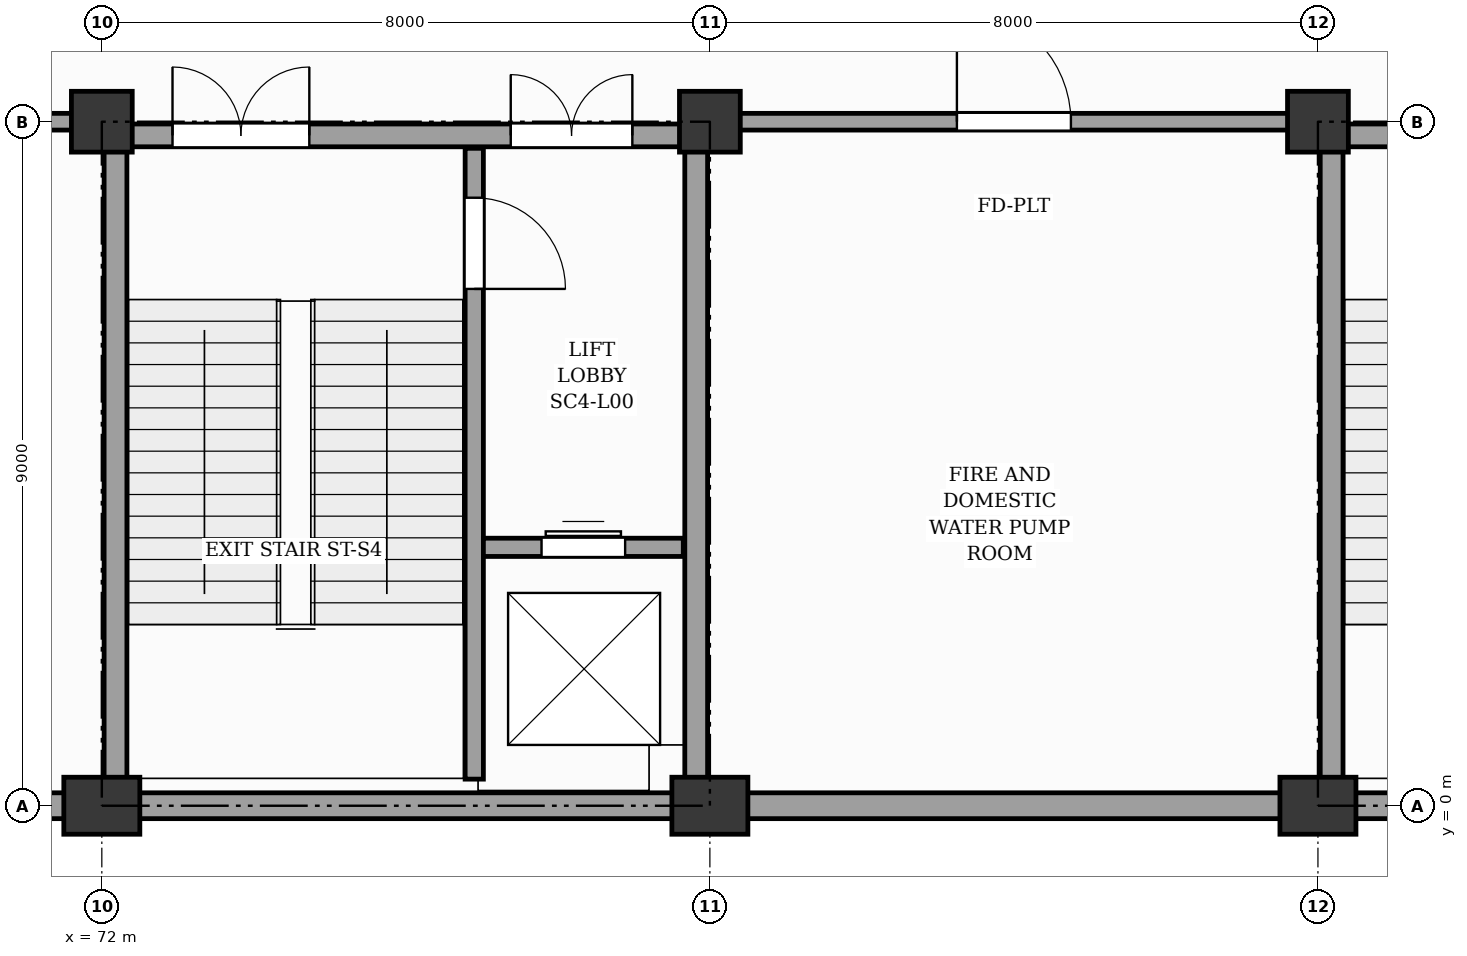
"""IFC4 building model, lengths in metres.
Left out: names, types, materials, properties, quantities, classifications, styles, units other than length and angle.
Written with IfcOpenShell. Run it as: python <this file> out.ifc"""

import sys

from ifc_helpers import new_model, si_unit, direction, frame, frame_2d, origin, origin_2d, place, context, subcontext, project, spatial, rectangle, extrude, element, fill, save


model = new_model("IFC4")
c1 = context("Model", 3, precision=1e-05, world=origin(), true_north=direction((0.0, 1.0)))
c2 = subcontext(c1, "Body", "Model", "MODEL_VIEW")
j1 = project(units=[si_unit("LENGTHUNIT", "METRE"), si_unit("PLANEANGLEUNIT", "RADIAN")], contexts=[c1])
p1 = place(None, origin())
s1 = spatial("IfcSite", under=j1, at=p1, CompositionType="ELEMENT")
p2 = place(p1, origin())
s2 = spatial("IfcBuilding", under=s1, at=p2, CompositionType="ELEMENT")
p3 = place(p2, origin())
s3 = spatial("IfcBuildingStorey", under=s2, at=p3, CompositionType="ELEMENT", Elevation=0.0)
p4 = place(p3, frame((72.0, 0.0, -0.3), z_axis=(0.0, 0.0, 1.0), x_axis=(1.0, 0.0, 0.0)))
e1 = element("IfcColumn", 1, at=p4, inside=s3, PredefinedType="PILASTER", context=c2, shape_type="SweptSolid", body=[
    extrude(rectangle(XDim=1.0, YDim=0.75, at=origin_2d()), origin(), (0.0, 0.0, 1.0), 5.1),
])
p5 = place(p3, frame((72.0, 9.0, -0.3), z_axis=(0.0, 0.0, 1.0), x_axis=(1.0, 0.0, 0.0)))
e2 = element("IfcColumn", 2, at=p5, inside=s3, PredefinedType="COLUMN", context=c2, shape_type="SweptSolid", body=[
    extrude(rectangle(XDim=0.8, YDim=0.8, at=origin_2d()), origin(), (0.0, 0.0, 1.0), 5.1),
])
p6 = place(p3, frame((80.0, 0.0, -0.3), z_axis=(0.0, 0.0, 1.0), x_axis=(1.0, 0.0, 0.0)))
e3 = element("IfcColumn", 3, at=p6, inside=s3, PredefinedType="PILASTER", context=c2, shape_type="SweptSolid", body=[
    extrude(rectangle(XDim=1.0, YDim=0.75, at=origin_2d()), origin(), (0.0, 0.0, 1.0), 5.1),
])
p7 = place(p3, frame((80.0, 9.0, -0.3), z_axis=(0.0, 0.0, 1.0), x_axis=(1.0, 0.0, 0.0)))
e4 = element("IfcColumn", 4, at=p7, inside=s3, PredefinedType="COLUMN", context=c2, shape_type="SweptSolid", body=[
    extrude(rectangle(XDim=0.8, YDim=0.8, at=origin_2d()), origin(), (0.0, 0.0, 1.0), 5.1),
])
p8 = place(p3, frame((88.0, 0.0, -0.3), z_axis=(0.0, 0.0, 1.0), x_axis=(1.0, 0.0, 0.0)))
e5 = element("IfcColumn", 5, at=p8, inside=s3, PredefinedType="PILASTER", context=c2, shape_type="SweptSolid", body=[
    extrude(rectangle(XDim=1.0, YDim=0.75, at=origin_2d()), origin(), (0.0, 0.0, 1.0), 5.1),
])
p9 = place(p3, frame((88.0, 9.0, -0.3), z_axis=(0.0, 0.0, 1.0), x_axis=(1.0, 0.0, 0.0)))
e6 = element("IfcColumn", 6, at=p9, inside=s3, PredefinedType="COLUMN", context=c2, shape_type="SweptSolid", body=[
    extrude(rectangle(XDim=0.8, YDim=0.8, at=origin_2d()), origin(), (0.0, 0.0, 1.0), 5.1),
])
p10 = place(p3, frame((64.4, 0.0, 0.0), z_axis=(0.0, 0.0, 1.0), x_axis=(1.0, 0.0, 0.0)))
e7 = element("IfcWall", 7, at=p10, inside=s3, PredefinedType="SOLIDWALL", context=c2, shape_type="SweptSolid", body=[
    extrude(rectangle(XDim=7.2, YDim=0.34, at=frame_2d((3.6, 0.0))), origin(), (0.0, 0.0, 1.0), 3.03),
])
for number, where, z_axis, x_axis in (
    (8, (72.4, 0.0, 0.0), (0.0, 0.0, 1.0), (1.0, 0.0, 0.0)),
    (9, (80.4, 0.0, 0.0), (0.0, 0.0, 1.0), (1.0, 0.0, 0.0)),
    (10, (88.4, 0.0, 0.0), (0.0, 0.0, 1.0), (1.0, 0.0, 0.0)),
):
    element("IfcWall", number, at=place(p3, frame(where, z_axis=z_axis, x_axis=x_axis)), inside=s3, PredefinedType="SOLIDWALL", context=c2, shape_type="SweptSolid", body=[
        extrude(rectangle(XDim=7.2, YDim=0.34, at=frame_2d((3.6, 0.0))), origin(), (0.0, 0.0, 1.0), 3.81),
    ])
p11 = place(p3, frame((88.18, 0.18, 0.0), z_axis=(0.0, 0.0, 1.0), x_axis=(0.0, 1.0, 0.0)))
e11 = element("IfcWall", 11, at=p11, inside=s3, PredefinedType="SHEAR", context=c2, shape_type="SweptSolid", body=[
    extrude(rectangle(XDim=8.64, YDim=0.3, at=frame_2d((4.32, 0.0))), origin(), (0.0, 0.0, 1.0), 4.52),
])
p12 = place(p3, frame((88.03, 8.82, 0.0), z_axis=(0.0, 0.0, 1.0), x_axis=(1.0, 0.0, 0.0)))
e12 = element("IfcWall", 12, at=p12, inside=s3, PredefinedType="SHEAR", context=c2, shape_type="SweptSolid", body=[
    extrude(rectangle(XDim=7.94, YDim=0.3, at=frame_2d((3.97, 0.0))), origin(), (0.0, 0.0, 1.0), 4.52),
])
p13 = place(p12, frame((5.35, 0.0, 0.0)))
e13 = element("IfcOpeningElement", 13, at=p13, cuts=e12, PredefinedType="OPENING", context=c2, shape_type="SweptSolid", body=[
    extrude(rectangle(XDim=1.6, YDim=2.15, at=frame_2d((0.8, 1.075))), frame((0.0, 0.16, 0.0), z_axis=(0.0, -1.0, 0.0), x_axis=(1.0, 0.0, 0.0)), (0.0, 0.0, 1.0), 0.32),
])
p14 = place(p12, frame((0.9, 0.0, 0.0)))
e14 = element("IfcOpeningElement", 14, at=p14, cuts=e12, PredefinedType="OPENING", context=c2, shape_type="SweptSolid", body=[
    extrude(rectangle(XDim=1.8, YDim=2.2, at=frame_2d((0.9, 1.1))), frame((0.0, 0.16, 0.0), z_axis=(0.0, -1.0, 0.0), x_axis=(1.0, 0.0, 0.0)), (0.0, 0.0, 1.0), 0.32),
])
p15 = place(p3, frame((76.9, 0.35, 0.0), z_axis=(0.0, 0.0, 1.0), x_axis=(0.0, 1.0, 0.0)))
e15 = element("IfcWall", 15, at=p15, inside=s3, PredefinedType="SHEAR", context=c2, shape_type="SweptSolid", body=[
    extrude(rectangle(XDim=8.3, YDim=0.24, at=frame_2d((4.15, 0.0))), origin(), (0.0, 0.0, 1.0), 4.52),
])
p16 = place(p15, frame((6.45, 0.0, 0.0)))
e16 = element("IfcOpeningElement", 16, at=p16, cuts=e15, PredefinedType="OPENING", context=c2, shape_type="SweptSolid", body=[
    extrude(rectangle(XDim=1.2, YDim=2.15, at=frame_2d((0.6, 1.075))), frame((0.0, 0.13, 0.0), z_axis=(0.0, -1.0, 0.0), x_axis=(1.0, 0.0, 0.0)), (0.0, 0.0, 1.0), 0.26),
])
p17 = place(p3, frame((77.02, 3.4, 0.0), z_axis=(0.0, 0.0, 1.0), x_axis=(1.0, 0.0, 0.0)))
e17 = element("IfcWall", 17, at=p17, inside=s3, PredefinedType="SHEAR", context=c2, shape_type="SweptSolid", body=[
    extrude(rectangle(XDim=2.63, YDim=0.24, at=frame_2d((1.315, 0.0))), origin(), (0.0, 0.0, 1.0), 4.52),
])
p18 = place(p17, frame((0.765, 0.0, 0.0)))
e18 = element("IfcOpeningElement", 18, at=p18, cuts=e17, PredefinedType="OPENING", context=c2, shape_type="SweptSolid", body=[
    extrude(rectangle(XDim=1.1, YDim=2.15, at=frame_2d((0.55, 1.075))), frame((0.0, 0.13, 0.0), z_axis=(0.0, -1.0, 0.0), x_axis=(1.0, 0.0, 0.0)), (0.0, 0.0, 1.0), 0.26),
])
for number, where, z_axis, x_axis in (
    (19, (72.18, 0.18, 0.0), (0.0, 0.0, 1.0), (0.0, 1.0, 0.0)),
    (20, (79.82, 0.18, 0.0), (0.0, 0.0, 1.0), (0.0, 1.0, 0.0)),
):
    element("IfcWall", number, at=place(p3, frame(where, z_axis=z_axis, x_axis=x_axis)), inside=s3, PredefinedType="SHEAR", context=c2, shape_type="SweptSolid", body=[
        extrude(rectangle(XDim=8.64, YDim=0.3, at=frame_2d((4.32, 0.0))), origin(), (0.0, 0.0, 1.0), 4.52),
    ])
p19 = place(p3, frame((72.03, 8.82, 0.0), z_axis=(0.0, 0.0, 1.0), x_axis=(1.0, 0.0, 0.0)))
e21 = element("IfcWall", 21, at=p19, inside=s3, PredefinedType="SHEAR", context=c2, shape_type="SweptSolid", body=[
    extrude(rectangle(XDim=7.94, YDim=0.3, at=frame_2d((3.97, 0.0))), origin(), (0.0, 0.0, 1.0), 4.52),
])
p20 = place(p19, frame((5.35, 0.0, 0.0)))
e22 = element("IfcOpeningElement", 22, at=p20, cuts=e21, PredefinedType="OPENING", context=c2, shape_type="SweptSolid", body=[
    extrude(rectangle(XDim=1.6, YDim=2.15, at=frame_2d((0.8, 1.075))), frame((0.0, 0.16, 0.0), z_axis=(0.0, -1.0, 0.0), x_axis=(1.0, 0.0, 0.0)), (0.0, 0.0, 1.0), 0.32),
])
p21 = place(p19, frame((0.9, 0.0, 0.0)))
e23 = element("IfcOpeningElement", 23, at=p21, cuts=e21, PredefinedType="OPENING", context=c2, shape_type="SweptSolid", body=[
    extrude(rectangle(XDim=1.8, YDim=2.2, at=frame_2d((0.9, 1.1))), frame((0.0, 0.16, 0.0), z_axis=(0.0, -1.0, 0.0), x_axis=(1.0, 0.0, 0.0)), (0.0, 0.0, 1.0), 0.32),
])
p22 = place(p3, frame((64.3, 9.0, 0.0), z_axis=(0.0, 0.0, 1.0), x_axis=(1.0, 0.0, 0.0)))
e24 = element("IfcWall", 24, at=p22, inside=s3, PredefinedType="SOLIDWALL", context=c2, shape_type="SweptSolid", body=[
    extrude(rectangle(XDim=7.4, YDim=0.22, at=frame_2d((3.7, 0.0))), origin(), (0.0, 0.0, 1.0), 2.73),
])
p23 = place(p3, frame((80.3, 9.0, 0.0), z_axis=(0.0, 0.0, 1.0), x_axis=(1.0, 0.0, 0.0)))
e25 = element("IfcWall", 25, at=p23, inside=s3, PredefinedType="SOLIDWALL", context=c2, shape_type="SweptSolid", body=[
    extrude(rectangle(XDim=7.4, YDim=0.22, at=frame_2d((3.7, 0.0))), origin(), (0.0, 0.0, 1.0), 3.56),
])
p24 = place(p23, frame((2.95, 0.0, 0.0)))
e26 = element("IfcOpeningElement", 26, at=p24, cuts=e25, PredefinedType="OPENING", context=c2, shape_type="SweptSolid", body=[
    extrude(rectangle(XDim=1.5, YDim=2.2, at=frame_2d((0.75, 1.1))), frame((0.0, 0.12, 0.0), z_axis=(0.0, -1.0, 0.0), x_axis=(1.0, 0.0, 0.0)), (0.0, 0.0, 1.0), 0.24),
])
p25 = place(p16, frame((1.2, 0.0, 0.0), z_axis=(0.0, 0.0, 1.0), x_axis=(-1.0, 0.0, 0.0)))
e27 = element("IfcDoor", 27, at=p25, inside=s3, OperationType="SINGLE_SWING_LEFT", PredefinedType="DOOR", context=c2, shape_type="SweptSolid", body=[
    extrude(rectangle(XDim=1.2, YDim=2.15, at=frame_2d((0.6, 1.075))), frame((0.0, 0.025, 0.0), z_axis=(0.0, -1.0, 0.0), x_axis=(1.0, 0.0, 0.0)), (0.0, 0.0, 1.0), 0.05),
])
fill(e16, e27)
p26 = place(p18, origin())
e28 = element("IfcDoor", 28, at=p26, inside=s3, OperationType="DOUBLE_DOOR_SLIDING", PredefinedType="DOOR", context=c2, shape_type="SweptSolid", body=[
    extrude(rectangle(XDim=1.1, YDim=2.15, at=frame_2d((0.55, 1.075))), frame((0.0, 0.025, 0.0), z_axis=(0.0, -1.0, 0.0), x_axis=(1.0, 0.0, 0.0)), (0.0, 0.0, 1.0), 0.05),
])
fill(e18, e28)
p27 = place(p20, origin())
e29 = element("IfcDoor", 29, at=p27, inside=s3, OperationType="DOUBLE_DOOR_SINGLE_SWING", PredefinedType="DOOR", context=c2, shape_type="SweptSolid", body=[
    extrude(rectangle(XDim=1.6, YDim=2.15, at=frame_2d((0.8, 1.075))), frame((0.0, 0.025, 0.0), z_axis=(0.0, -1.0, 0.0), x_axis=(1.0, 0.0, 0.0)), (0.0, 0.0, 1.0), 0.05),
])
fill(e22, e29)
p28 = place(p21, origin())
e30 = element("IfcDoor", 30, at=p28, inside=s3, OperationType="DOUBLE_DOOR_SINGLE_SWING", PredefinedType="DOOR", context=c2, shape_type="SweptSolid", body=[
    extrude(rectangle(XDim=1.8, YDim=2.2, at=frame_2d((0.9, 1.1))), frame((0.0, 0.025, 0.0), z_axis=(0.0, -1.0, 0.0), x_axis=(1.0, 0.0, 0.0)), (0.0, 0.0, 1.0), 0.05),
])
fill(e23, e30)
p29 = place(p24, origin())
e31 = element("IfcDoor", 31, at=p29, inside=s3, OperationType="SINGLE_SWING_LEFT", PredefinedType="DOOR", context=c2, shape_type="SweptSolid", body=[
    extrude(rectangle(XDim=1.5, YDim=2.2, at=frame_2d((0.75, 1.1))), frame((0.0, 0.025, 0.0), z_axis=(0.0, -1.0, 0.0), x_axis=(1.0, 0.0, 0.0)), (0.0, 0.0, 1.0), 0.05),
])
fill(e26, e31)
save(model, sys.argv[1])
